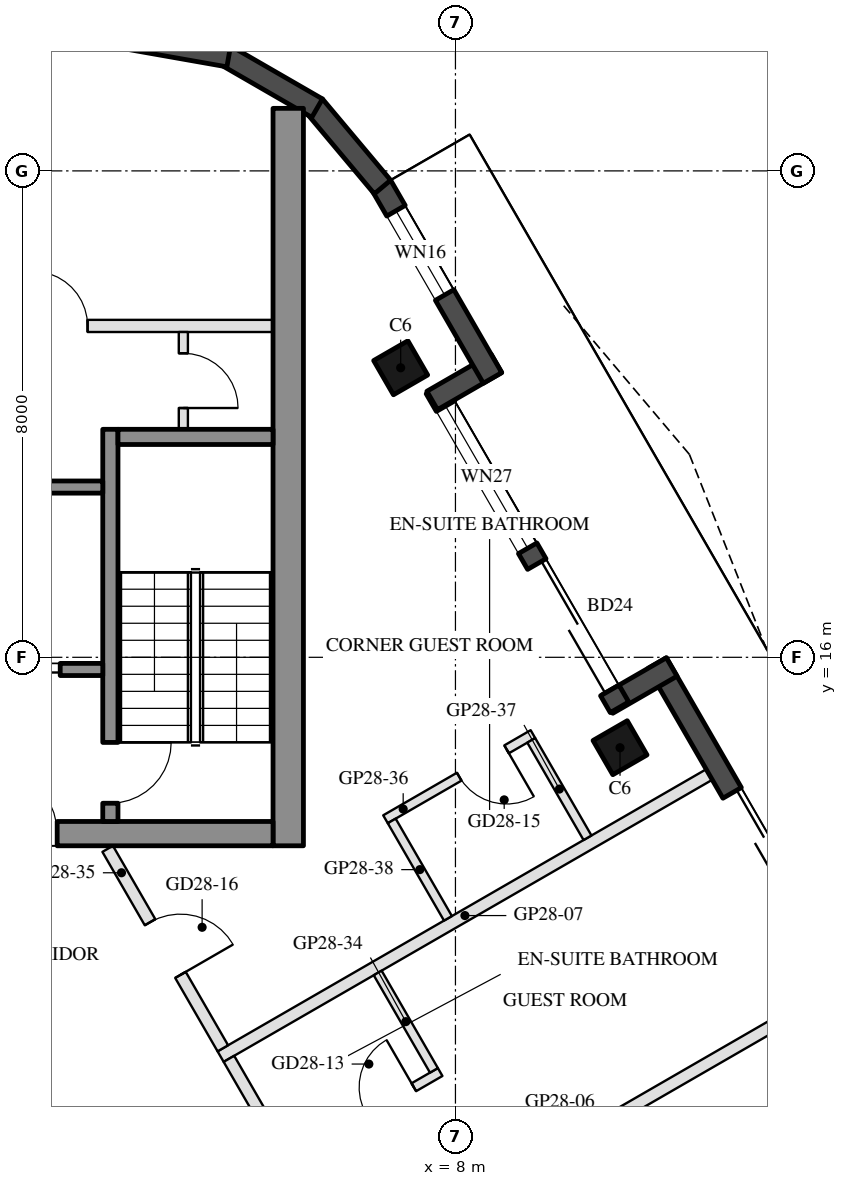
"""IFC4 building model, lengths in metres.
Left out: names, types, materials, properties, quantities, classifications, styles, units other than length and angle.
Written with IfcOpenShell. Run it as: python <this file> out.ifc"""

import sys

from ifc_helpers import new_model, si_unit, direction, frame, frame_2d, origin, origin_2d, place, context, subcontext, project, spatial, rectangle, hollow_rectangle, extrude, boolean, halfspace, element, fill, save


model = new_model("IFC4")
c1 = context("Model", 3, precision=1e-05, world=origin(), true_north=direction((0.0, 1.0)))
c2 = subcontext(c1, "Body", "Model", "MODEL_VIEW")
j1 = project(units=[si_unit("LENGTHUNIT", "METRE"), si_unit("PLANEANGLEUNIT", "RADIAN")], contexts=[c1])
p1 = place(None, origin())
s1 = spatial("IfcSite", under=j1, at=p1, CompositionType="ELEMENT")
p2 = place(p1, origin())
s2 = spatial("IfcBuilding", under=s1, at=p2, CompositionType="ELEMENT")
p3 = place(p2, frame((0.0, 0.0, 283.7)))
s3 = spatial("IfcBuildingStorey", under=s2, at=p3, CompositionType="ELEMENT", Elevation=283.7)
p4 = place(p3, frame((10.707, 14.513, 0.0), z_axis=(0.0, 0.0, 1.0), x_axis=(-0.5, 0.866025403784, 0.0)))
e1 = element("IfcColumn", 1, at=p4, inside=s3, PredefinedType="COLUMN", context=c2, shape_type="SweptSolid", body=[
    boolean("DIFFERENCE", extrude(hollow_rectangle(XDim=0.65, YDim=0.65, WallThickness=0.03, at=origin_2d()), origin(), (0.0, 0.0, 1.0), 3.7), halfspace(frame((0.0, 0.0, 3.66), z_axis=(0.0, 0.0, 1.0), x_axis=(1.0, 0.0, 0.0)), False)),
])
p5 = place(p3, frame((7.099, 20.762, 0.0), z_axis=(0.0, 0.0, 1.0), x_axis=(-0.5, 0.866025403784, 0.0)))
e2 = element("IfcColumn", 2, at=p5, inside=s3, PredefinedType="COLUMN", context=c2, shape_type="SweptSolid", body=[
    boolean("DIFFERENCE", extrude(hollow_rectangle(XDim=0.65, YDim=0.65, WallThickness=0.03, at=origin_2d()), origin(), (0.0, 0.0, 1.0), 3.7), halfspace(frame((0.0, 0.0, 3.653), z_axis=(0.0, 0.0, 1.0), x_axis=(1.0, 0.0, 0.0)), False)),
])
p6 = place(p3, frame((15.825, 8.097, 0.0), z_axis=(0.0, 0.0, 1.0), x_axis=(-0.500006872736, 0.866021435772, 0.0)))
e3 = element("IfcWall", 3, at=p6, inside=s3, PredefinedType="SOLIDWALL", context=c2, shape_type="SweptSolid", body=[
    extrude(rectangle(XDim=9.015, YDim=0.35, at=frame_2d((4.508, 0.0))), origin(), (0.0, 0.0, 1.0), 3.55),
])
p7 = place(p6, frame((1.575, 0.0, 0.3)))
e4 = element("IfcOpeningElement", 4, at=p7, cuts=e3, PredefinedType="OPENING", context=c2, shape_type="SweptSolid", body=[
    extrude(rectangle(XDim=0.8, YDim=2.65, at=frame_2d((0.4, 1.325))), frame((0.0, 0.185, 0.0), z_axis=(0.0, -1.0, 0.0), x_axis=(1.0, 0.0, 0.0)), (0.0, 0.0, 1.0), 0.37),
])
p8 = place(p6, frame((4.75, 0.0, 0.0)))
e5 = element("IfcOpeningElement", 5, at=p8, cuts=e3, PredefinedType="OPENING", context=c2, shape_type="SweptSolid", body=[
    extrude(rectangle(XDim=1.8, YDim=2.4, at=frame_2d((0.9, 1.2))), frame((0.0, 0.185, 0.0), z_axis=(0.0, -1.0, 0.0), x_axis=(1.0, 0.0, 0.0)), (0.0, 0.0, 1.0), 0.37),
])
p9 = place(p6, frame((3.35, 0.0, 0.3)))
e6 = element("IfcOpeningElement", 6, at=p9, cuts=e3, PredefinedType="OPENING", context=c2, shape_type="SweptSolid", body=[
    extrude(rectangle(XDim=1.0, YDim=2.65, at=frame_2d((0.5, 1.325))), frame((0.0, 0.185, 0.0), z_axis=(0.0, -1.0, 0.0), x_axis=(1.0, 0.0, 0.0)), (0.0, 0.0, 1.0), 0.37),
])
p10 = place(p3, frame((11.557, 15.841, 0.0), z_axis=(0.0, 0.0, 1.0), x_axis=(-0.866005645448, -0.500034220881, 0.0)))
e7 = element("IfcWall", 7, at=p10, inside=s3, PredefinedType="SOLIDWALL", context=c2, shape_type="SweptSolid", body=[
    extrude(rectangle(XDim=1.22, YDim=0.35, at=frame_2d((0.61, 0.0))), origin(), (0.0, 0.0, 1.0), 3.55),
])
p11 = place(p3, frame((10.698, 15.178, 0.0), z_axis=(0.0, 0.0, 1.0), x_axis=(-0.499985371027, 0.866033849661, 0.0)))
e8 = element("IfcWall", 8, at=p11, inside=s3, PredefinedType="SOLIDWALL", context=c2, shape_type="SweptSolid", body=[
    extrude(rectangle(XDim=6.055, YDim=0.35, at=frame_2d((3.028, 0.0))), origin(), (0.0, 0.0, 1.0), 3.55),
])
p12 = place(p11, frame((0.32, 0.0, 0.0)))
e9 = element("IfcOpeningElement", 9, at=p12, cuts=e8, PredefinedType="OPENING", context=c2, shape_type="SweptSolid", body=[
    extrude(rectangle(XDim=2.4, YDim=2.4, at=frame_2d((1.2, 1.2))), frame((0.0, 0.185, 0.0), z_axis=(0.0, -1.0, 0.0), x_axis=(1.0, 0.0, 0.0)), (0.0, 0.0, 1.0), 0.37),
])
p13 = place(p11, frame((3.02, 0.0, 0.3)))
e10 = element("IfcOpeningElement", 10, at=p13, cuts=e8, PredefinedType="OPENING", context=c2, shape_type="SweptSolid", body=[
    extrude(rectangle(XDim=2.7, YDim=2.65, at=frame_2d((1.35, 1.325))), frame((0.0, 0.185, 0.0), z_axis=(0.0, -1.0, 0.0), x_axis=(1.0, 0.0, 0.0)), (0.0, 0.0, 1.0), 0.37),
])
p14 = place(p3, frame((7.617, 20.224, 0.0), z_axis=(0.0, 0.0, 1.0), x_axis=(0.866005645448, 0.500034220881, 0.0)))
e11 = element("IfcWall", 11, at=p14, inside=s3, PredefinedType="SOLIDWALL", context=c2, shape_type="SweptSolid", body=[
    extrude(rectangle(XDim=1.22, YDim=0.35, at=frame_2d((0.61, 0.0))), origin(), (0.0, 0.0, 1.0), 3.55),
])
p15 = place(p3, frame((8.61, 20.595, 0.0), z_axis=(0.0, 0.0, 1.0), x_axis=(-0.499990402704, 0.866030944715, 0.0)))
e12 = element("IfcWall", 12, at=p15, inside=s3, PredefinedType="SOLIDWALL", context=c2, shape_type="SweptSolid", body=[
    extrude(rectangle(XDim=3.654, YDim=0.35, at=frame_2d((1.827, 0.0))), origin(), (0.0, 0.0, 1.0), 3.55),
])
p16 = place(p15, frame((1.575, 0.0, 0.3)))
e13 = element("IfcOpeningElement", 13, at=p16, cuts=e12, PredefinedType="OPENING", context=c2, shape_type="SweptSolid", body=[
    extrude(rectangle(XDim=1.6, YDim=2.65, at=frame_2d((0.8, 1.325))), frame((0.0, 0.185, 0.0), z_axis=(0.0, -1.0, 0.0), x_axis=(1.0, 0.0, 0.0)), (0.0, 0.0, 1.0), 0.37),
])
for number, where, z_axis, x_axis in (
    (14, (6.8, 23.735, 0.0), (0.0, 0.0, 1.0), (-0.643, 0.766, 0.0)),
    (15, (5.725, 25.032, 0.0), (0.0, 0.0, 1.0), (-0.866, 0.5, 0.0)),
    (16, (4.271, 25.884, 0.0), (0.0, 0.0, 1.0), (-0.985, 0.174, 0.0)),
):
    element("IfcWall", number, at=place(p3, frame(where, z_axis=z_axis, x_axis=x_axis)), inside=s3, PredefinedType="SOLIDWALL", context=c2, shape_type="SweptSolid", body=[
        extrude(rectangle(XDim=1.745, YDim=0.35, at=frame_2d((0.872, 0.0))), origin(), (0.0, 0.0, 1.0), 3.55),
    ])
p17 = place(p3, frame((5.25, 12.9, 0.0), z_axis=(0.0, 0.0, 1.0), x_axis=(0.0, 1.0, 0.0)))
e17 = element("IfcWall", 17, at=p17, inside=s3, PredefinedType="SHEAR", context=c2, shape_type="SweptSolid", body=[
    extrude(rectangle(XDim=12.129, YDim=0.5, at=frame_2d((6.064, 0.0))), origin(), (0.0, 0.0, 1.0), 3.5),
])
p18 = place(p3, frame((5.0, 13.1, 0.0), z_axis=(0.0, 0.0, 1.0), x_axis=(-1.0, 0.0, 0.0)))
e18 = element("IfcWall", 18, at=p18, inside=s3, PredefinedType="SHEAR", context=c2, shape_type="SweptSolid", body=[
    extrude(rectangle(XDim=10.0, YDim=0.4, at=frame_2d((5.0, 0.0))), origin(), (0.0, 0.0, 1.0), 3.5),
])
p19 = place(p18, frame((3.55, 0.0, 0.0)))
e19 = element("IfcOpeningElement", 19, at=p19, cuts=e18, PredefinedType="OPENING", context=c2, shape_type="SweptSolid", body=[
    extrude(rectangle(XDim=1.1, YDim=2.1, at=frame_2d((0.55, 1.05))), frame((0.0, 0.21, 0.0), z_axis=(0.0, -1.0, 0.0), x_axis=(1.0, 0.0, 0.0)), (0.0, 0.0, 1.0), 0.42),
])
p20 = place(p18, frame((5.85, 0.0, 0.0)))
e20 = element("IfcOpeningElement", 20, at=p20, cuts=e18, PredefinedType="OPENING", context=c2, shape_type="SweptSolid", body=[
    extrude(rectangle(XDim=1.4, YDim=2.1, at=frame_2d((0.7, 1.05))), frame((0.0, 0.21, 0.0), z_axis=(0.0, -1.0, 0.0), x_axis=(1.0, 0.0, 0.0)), (0.0, 0.0, 1.0), 0.42),
])
p21 = place(p3, frame((2.325, 13.3, 0.0), z_axis=(0.0, 0.0, 1.0), x_axis=(0.0, 1.0, 0.0)))
e21 = element("IfcWall", 21, at=p21, inside=s3, PredefinedType="SHEAR", context=c2, shape_type="SweptSolid", body=[
    extrude(rectangle(XDim=6.45, YDim=0.25, at=frame_2d((3.225, 0.0))), origin(), (0.0, 0.0, 1.0), 3.5),
])
p22 = place(p21, frame((0.3, 0.0, 0.0)))
e22 = element("IfcOpeningElement", 22, at=p22, cuts=e21, PredefinedType="OPENING", context=c2, shape_type="SweptSolid", body=[
    extrude(rectangle(XDim=1.0, YDim=2.1, at=frame_2d((0.5, 1.05))), frame((0.0, 0.135, 0.0), z_axis=(0.0, -1.0, 0.0), x_axis=(1.0, 0.0, 0.0)), (0.0, 0.0, 1.0), 0.27),
])
p23 = place(p3, frame((5.0, 19.625, 0.0), z_axis=(0.0, 0.0, 1.0), x_axis=(-1.0, 0.0, 0.0)))
e23 = element("IfcWall", 23, at=p23, inside=s3, PredefinedType="SHEAR", context=c2, shape_type="SweptSolid", body=[
    extrude(rectangle(XDim=2.55, YDim=0.25, at=frame_2d((1.275, 0.0))), origin(), (0.0, 0.0, 1.0), 3.5),
])
p24 = place(p3, frame((2.2, 18.8, 0.0), z_axis=(0.0, 0.0, 1.0), x_axis=(-1.0, 0.0, 0.0)))
e24 = element("IfcWall", 24, at=p24, inside=s3, PredefinedType="SHEAR", context=c2, shape_type="SweptSolid", body=[
    extrude(rectangle(XDim=2.8, YDim=0.2, at=frame_2d((1.4, 0.0))), origin(), (0.0, 0.0, 1.0), 3.5),
])
p25 = place(p3, frame((2.2, 15.8, 0.0), z_axis=(0.0, 0.0, 1.0), x_axis=(-1.0, 0.0, 0.0)))
e25 = element("IfcWall", 25, at=p25, inside=s3, PredefinedType="SHEAR", context=c2, shape_type="SweptSolid", body=[
    extrude(rectangle(XDim=2.8, YDim=0.2, at=frame_2d((1.4, 0.0))), origin(), (0.0, 0.0, 1.0), 3.5),
])
p26 = place(p25, frame((0.7, 0.0, 0.0)))
e26 = element("IfcOpeningElement", 26, at=p26, cuts=e25, PredefinedType="OPENING", context=c2, shape_type="SweptSolid", body=[
    extrude(rectangle(XDim=1.2, YDim=2.1, at=frame_2d((0.6, 1.05))), frame((0.0, 0.11, 0.0), z_axis=(0.0, -1.0, 0.0), x_axis=(1.0, 0.0, 0.0)), (0.0, 0.0, 1.0), 0.22),
])
p27 = place(p3, frame((5.0, 21.45, 0.0), z_axis=(0.0, 0.0, 1.0), x_axis=(-1.0, 0.0, 0.0)))
e27 = element("IfcWall", 27, at=p27, inside=s3, PredefinedType="PARTITIONING", context=c2, shape_type="SweptSolid", body=[
    extrude(rectangle(XDim=5.4, YDim=0.2, at=frame_2d((2.7, 0.0))), origin(), (0.0, 0.0, 1.0), 3.5),
])
p28 = place(p27, frame((3.05, 0.0, 0.0)))
e28 = element("IfcOpeningElement", 28, at=p28, cuts=e27, PredefinedType="OPENING", context=c2, shape_type="SweptSolid", body=[
    extrude(rectangle(XDim=0.9, YDim=2.1, at=frame_2d((0.45, 1.05))), frame((0.0, 0.11, 0.0), z_axis=(0.0, -1.0, 0.0), x_axis=(1.0, 0.0, 0.0)), (0.0, 0.0, 1.0), 0.22),
])
p29 = place(p3, frame((3.525, 19.75, 0.0), z_axis=(0.0, 0.0, 1.0), x_axis=(0.0, 1.0, 0.0)))
e29 = element("IfcWall", 29, at=p29, inside=s3, PredefinedType="PARTITIONING", context=c2, shape_type="SweptSolid", body=[
    extrude(rectangle(XDim=1.6, YDim=0.15, at=frame_2d((0.8, 0.0))), origin(), (0.0, 0.0, 1.0), 3.5),
])
p30 = place(p29, frame((0.35, 0.0, 0.0)))
e30 = element("IfcOpeningElement", 30, at=p30, cuts=e29, PredefinedType="OPENING", context=c2, shape_type="SweptSolid", body=[
    extrude(rectangle(XDim=0.9, YDim=2.1, at=frame_2d((0.45, 1.05))), frame((0.0, 0.085, 0.0), z_axis=(0.0, -1.0, 0.0), x_axis=(1.0, 0.0, 0.0)), (0.0, 0.0, 1.0), 0.17),
])
p31 = place(p3, frame((14.224, 10.521, 0.0), z_axis=(0.0, 0.0, 1.0), x_axis=(-0.866024341471, -0.500001839976, 0.0)))
e31 = element("IfcWall", 31, at=p31, inside=s3, PredefinedType="PARTITIONING", context=c2, shape_type="SweptSolid", body=[
    extrude(rectangle(XDim=9.279, YDim=0.2, at=frame_2d((4.639, 0.0))), origin(), (0.0, 0.0, 1.0), 3.1),
])
p32 = place(p3, frame((12.174, 14.072, 0.0), z_axis=(0.0, 0.0, 1.0), x_axis=(-0.866035734738, -0.499982105836, 0.0)))
e32 = element("IfcWall", 32, at=p32, inside=s3, PredefinedType="PARTITIONING", context=c2, shape_type="SweptSolid", body=[
    extrude(rectangle(XDim=9.279, YDim=0.2, at=frame_2d((4.639, 0.0))), origin(), (0.0, 0.0, 1.0), 3.1),
])
p33 = place(p3, frame((4.275, 9.396, 0.0), z_axis=(0.0, 0.0, 1.0), x_axis=(0.499997012787, -0.866027128446, 0.0)))
e33 = element("IfcWall", 33, at=p33, inside=s3, PredefinedType="PARTITIONING", context=c2, shape_type="SweptSolid", body=[
    extrude(rectangle(XDim=3.9, YDim=0.2, at=frame_2d((1.95, 0.0))), origin(), (0.0, 0.0, 1.0), 3.05),
])
p34 = place(p33, frame((2.45, 0.0, 0.0)))
e34 = element("IfcOpeningElement", 34, at=p34, cuts=e33, PredefinedType="OPENING", context=c2, shape_type="SweptSolid", body=[
    extrude(rectangle(XDim=1.0, YDim=2.1, at=frame_2d((0.5, 1.05))), frame((0.0, 0.11, 0.0), z_axis=(0.0, -1.0, 0.0), x_axis=(1.0, 0.0, 0.0)), (0.0, 0.0, 1.0), 0.22),
])
p35 = place(p3, frame((5.324, 7.779, 0.0), z_axis=(0.0, 0.0, 1.0), x_axis=(0.865996816683, 0.500049511043, 0.0)))
e35 = element("IfcWall", 35, at=p35, inside=s3, PredefinedType="PARTITIONING", context=c2, shape_type="SweptSolid", body=[
    extrude(rectangle(XDim=2.8, YDim=0.15, at=frame_2d((1.4, 0.0))), origin(), (0.0, 0.0, 1.0), 3.55),
])
p36 = place(p35, frame((1.4, 0.0, 0.0)))
e36 = element("IfcOpeningElement", 36, at=p36, cuts=e35, PredefinedType="OPENING", context=c2, shape_type="SweptSolid", body=[
    extrude(rectangle(XDim=0.9, YDim=2.1, at=frame_2d((0.45, 1.05))), frame((0.0, 0.085, 0.0), z_axis=(0.0, -1.0, 0.0), x_axis=(1.0, 0.0, 0.0)), (0.0, 0.0, 1.0), 0.17),
])
p37 = place(p3, frame((7.646, 9.207, 0.0), z_axis=(0.0, 0.0, 1.0), x_axis=(-0.49994333299, 0.866058118026, 0.0)))
e37 = element("IfcWall", 37, at=p37, inside=s3, PredefinedType="PARTITIONING", context=c2, shape_type="SweptSolid", body=[
    extrude(rectangle(XDim=1.85, YDim=0.15, at=frame_2d((0.925, 0.0))), origin(), (0.0, 0.0, 1.0), 3.55),
])
p38 = place(p3, frame((2.281, 12.85, 0.0), z_axis=(0.0, 0.0, 1.0), x_axis=(0.499979074716, -0.866037484666, 0.0)))
e38 = element("IfcWall", 38, at=p38, inside=s3, PredefinedType="PARTITIONING", context=c2, shape_type="SweptSolid", body=[
    extrude(rectangle(XDim=3.788, YDim=0.2, at=frame_2d((1.894, 0.0))), origin(), (0.0, 0.0, 1.0), 3.05),
])
p39 = place(p38, frame((1.394, 0.0, 0.0)))
e39 = element("IfcOpeningElement", 39, at=p39, cuts=e38, PredefinedType="OPENING", context=c2, shape_type="SweptSolid", body=[
    extrude(rectangle(XDim=1.0, YDim=2.1, at=frame_2d((0.5, 1.05))), frame((0.0, 0.11, 0.0), z_axis=(0.0, -1.0, 0.0), x_axis=(1.0, 0.0, 0.0)), (0.0, 0.0, 1.0), 0.22),
])
p40 = place(p3, frame((9.274, 14.737, 0.0), z_axis=(0.0, 0.0, 1.0), x_axis=(-0.866018616679, -0.500011755427, 0.0)))
e40 = element("IfcWall", 40, at=p40, inside=s3, PredefinedType="PARTITIONING", context=c2, shape_type="SweptSolid", body=[
    extrude(rectangle(XDim=2.8, YDim=0.15, at=frame_2d((1.4, 0.0))), origin(), (0.0, 0.0, 1.0), 3.55),
])
p41 = place(p40, frame((0.5, 0.0, 0.0)))
e41 = element("IfcOpeningElement", 41, at=p41, cuts=e40, PredefinedType="OPENING", context=c2, shape_type="SweptSolid", body=[
    extrude(rectangle(XDim=0.9, YDim=2.1, at=frame_2d((0.45, 1.05))), frame((0.0, 0.085, 0.0), z_axis=(0.0, -1.0, 0.0), x_axis=(1.0, 0.0, 0.0)), (0.0, 0.0, 1.0), 0.17),
])
p42 = place(p3, frame((10.172, 13.032, 0.0), z_axis=(0.0, 0.0, 1.0), x_axis=(-0.500042316284, 0.866000971088, 0.0)))
e42 = element("IfcWall", 42, at=p42, inside=s3, PredefinedType="PARTITIONING", context=c2, shape_type="SweptSolid", body=[
    extrude(rectangle(XDim=1.85, YDim=0.15, at=frame_2d((0.925, 0.0))), origin(), (0.0, 0.0, 1.0), 3.05),
])
p43 = place(p3, frame((7.877, 11.707, 0.0), z_axis=(0.0, 0.0, 1.0), x_axis=(-0.499985172903, 0.866033964044, 0.0)))
e43 = element("IfcWall", 43, at=p43, inside=s3, PredefinedType="PARTITIONING", context=c2, shape_type="SweptSolid", body=[
    extrude(rectangle(XDim=1.85, YDim=0.15, at=frame_2d((0.925, 0.0))), origin(), (0.0, 0.0, 1.0), 3.05),
])
p44 = place(p8, frame((1.8, 0.0, 0.0), z_axis=(0.0, 0.0, 1.0), x_axis=(-1.0, 0.0, 0.0)))
e44 = element("IfcDoor", 44, at=p44, inside=s3, OperationType="SLIDING_TO_LEFT", PredefinedType="DOOR", context=c2, shape_type="SweptSolid", body=[
    extrude(rectangle(XDim=1.8, YDim=2.4, at=frame_2d((0.9, 1.2))), frame((0.0, 0.025, 0.0), z_axis=(0.0, -1.0, 0.0), x_axis=(1.0, 0.0, 0.0)), (0.0, 0.0, 1.0), 0.05),
])
fill(e5, e44)
p45 = place(p12, frame((2.4, 0.0, 0.0), z_axis=(0.0, 0.0, 1.0), x_axis=(-1.0, 0.0, 0.0)))
e45 = element("IfcDoor", 45, at=p45, inside=s3, OperationType="SLIDING_TO_LEFT", PredefinedType="DOOR", context=c2, shape_type="SweptSolid", body=[
    extrude(rectangle(XDim=2.4, YDim=2.4, at=frame_2d((1.2, 1.2))), frame((0.0, 0.025, 0.0), z_axis=(0.0, -1.0, 0.0), x_axis=(1.0, 0.0, 0.0)), (0.0, 0.0, 1.0), 0.05),
])
fill(e9, e45)
p46 = place(p13, origin())
e46 = element("IfcWindow", 46, at=p46, inside=s3, PartitioningType="SINGLE_PANEL", PredefinedType="WINDOW", context=c2, shape_type="SweptSolid", body=[
    extrude(rectangle(XDim=2.7, YDim=2.65, at=frame_2d((1.35, 1.325))), frame((0.0, 0.03, 0.0), z_axis=(0.0, -1.0, 0.0), x_axis=(1.0, 0.0, 0.0)), (0.0, 0.0, 1.0), 0.06),
])
fill(e10, e46)
p47 = place(p16, origin())
e47 = element("IfcWindow", 47, at=p47, inside=s3, PartitioningType="SINGLE_PANEL", PredefinedType="WINDOW", context=c2, shape_type="SweptSolid", body=[
    extrude(rectangle(XDim=1.6, YDim=2.65, at=frame_2d((0.8, 1.325))), frame((0.0, 0.03, 0.0), z_axis=(0.0, -1.0, 0.0), x_axis=(1.0, 0.0, 0.0)), (0.0, 0.0, 1.0), 0.06),
])
fill(e13, e47)
p48 = place(p26, origin())
e48 = element("IfcDoor", 48, at=p48, inside=s3, OperationType="DOUBLE_DOOR_SLIDING", PredefinedType="DOOR", context=c2, shape_type="SweptSolid", body=[
    extrude(rectangle(XDim=1.2, YDim=2.1, at=frame_2d((0.6, 1.05))), frame((0.0, 0.025, 0.0), z_axis=(0.0, -1.0, 0.0), x_axis=(1.0, 0.0, 0.0)), (0.0, 0.0, 1.0), 0.05),
])
fill(e26, e48)
p49 = place(p30, frame((0.9, 0.0, 0.0), z_axis=(0.0, 0.0, 1.0), x_axis=(-1.0, 0.0, 0.0)))
e49 = element("IfcDoor", 49, at=p49, inside=s3, OperationType="SINGLE_SWING_RIGHT", PredefinedType="DOOR", context=c2, shape_type="SweptSolid", body=[
    extrude(rectangle(XDim=0.9, YDim=2.1, at=frame_2d((0.45, 1.05))), frame((0.0, 0.025, 0.0), z_axis=(0.0, -1.0, 0.0), x_axis=(1.0, 0.0, 0.0)), (0.0, 0.0, 1.0), 0.05),
])
fill(e30, e49)
p50 = place(p28, frame((0.9, 0.0, 0.0), z_axis=(0.0, 0.0, 1.0), x_axis=(-1.0, 0.0, 0.0)))
e50 = element("IfcDoor", 50, at=p50, inside=s3, OperationType="SINGLE_SWING_LEFT", PredefinedType="DOOR", context=c2, shape_type="SweptSolid", body=[
    extrude(rectangle(XDim=0.9, YDim=2.1, at=frame_2d((0.45, 1.05))), frame((0.0, 0.025, 0.0), z_axis=(0.0, -1.0, 0.0), x_axis=(1.0, 0.0, 0.0)), (0.0, 0.0, 1.0), 0.05),
])
fill(e28, e50)
p51 = place(p19, frame((1.1, 0.0, 0.0), z_axis=(0.0, 0.0, 1.0), x_axis=(-1.0, 0.0, 0.0)))
e51 = element("IfcDoor", 51, at=p51, inside=s3, OperationType="SINGLE_SWING_LEFT", PredefinedType="DOOR", context=c2, shape_type="SweptSolid", body=[
    extrude(rectangle(XDim=1.1, YDim=2.1, at=frame_2d((0.55, 1.05))), frame((0.0, 0.025, 0.0), z_axis=(0.0, -1.0, 0.0), x_axis=(1.0, 0.0, 0.0)), (0.0, 0.0, 1.0), 0.05),
])
fill(e19, e51)
p52 = place(p22, frame((1.0, 0.0, 0.0), z_axis=(0.0, 0.0, 1.0), x_axis=(-1.0, 0.0, 0.0)))
e52 = element("IfcDoor", 52, at=p52, inside=s3, OperationType="SINGLE_SWING_LEFT", PredefinedType="DOOR", context=c2, shape_type="SweptSolid", body=[
    extrude(rectangle(XDim=1.0, YDim=2.1, at=frame_2d((0.5, 1.05))), frame((0.0, 0.025, 0.0), z_axis=(0.0, -1.0, 0.0), x_axis=(1.0, 0.0, 0.0)), (0.0, 0.0, 1.0), 0.05),
])
fill(e22, e52)
p53 = place(p36, origin())
e53 = element("IfcDoor", 53, at=p53, inside=s3, OperationType="SINGLE_SWING_RIGHT", PredefinedType="DOOR", context=c2, shape_type="SweptSolid", body=[
    extrude(rectangle(XDim=0.9, YDim=2.1, at=frame_2d((0.45, 1.05))), frame((0.0, 0.025, 0.0), z_axis=(0.0, -1.0, 0.0), x_axis=(1.0, 0.0, 0.0)), (0.0, 0.0, 1.0), 0.05),
])
fill(e36, e53)
p54 = place(p41, origin())
e54 = element("IfcDoor", 54, at=p54, inside=s3, OperationType="SINGLE_SWING_LEFT", PredefinedType="DOOR", context=c2, shape_type="SweptSolid", body=[
    extrude(rectangle(XDim=0.9, YDim=2.1, at=frame_2d((0.45, 1.05))), frame((0.0, 0.025, 0.0), z_axis=(0.0, -1.0, 0.0), x_axis=(1.0, 0.0, 0.0)), (0.0, 0.0, 1.0), 0.05),
])
fill(e41, e54)
p55 = place(p39, origin())
e55 = element("IfcDoor", 55, at=p55, inside=s3, OperationType="SINGLE_SWING_RIGHT", PredefinedType="DOOR", context=c2, shape_type="SweptSolid", body=[
    extrude(rectangle(XDim=1.0, YDim=2.1, at=frame_2d((0.5, 1.05))), frame((0.0, 0.025, 0.0), z_axis=(0.0, -1.0, 0.0), x_axis=(1.0, 0.0, 0.0)), (0.0, 0.0, 1.0), 0.05),
])
fill(e39, e55)
save(model, sys.argv[1])
